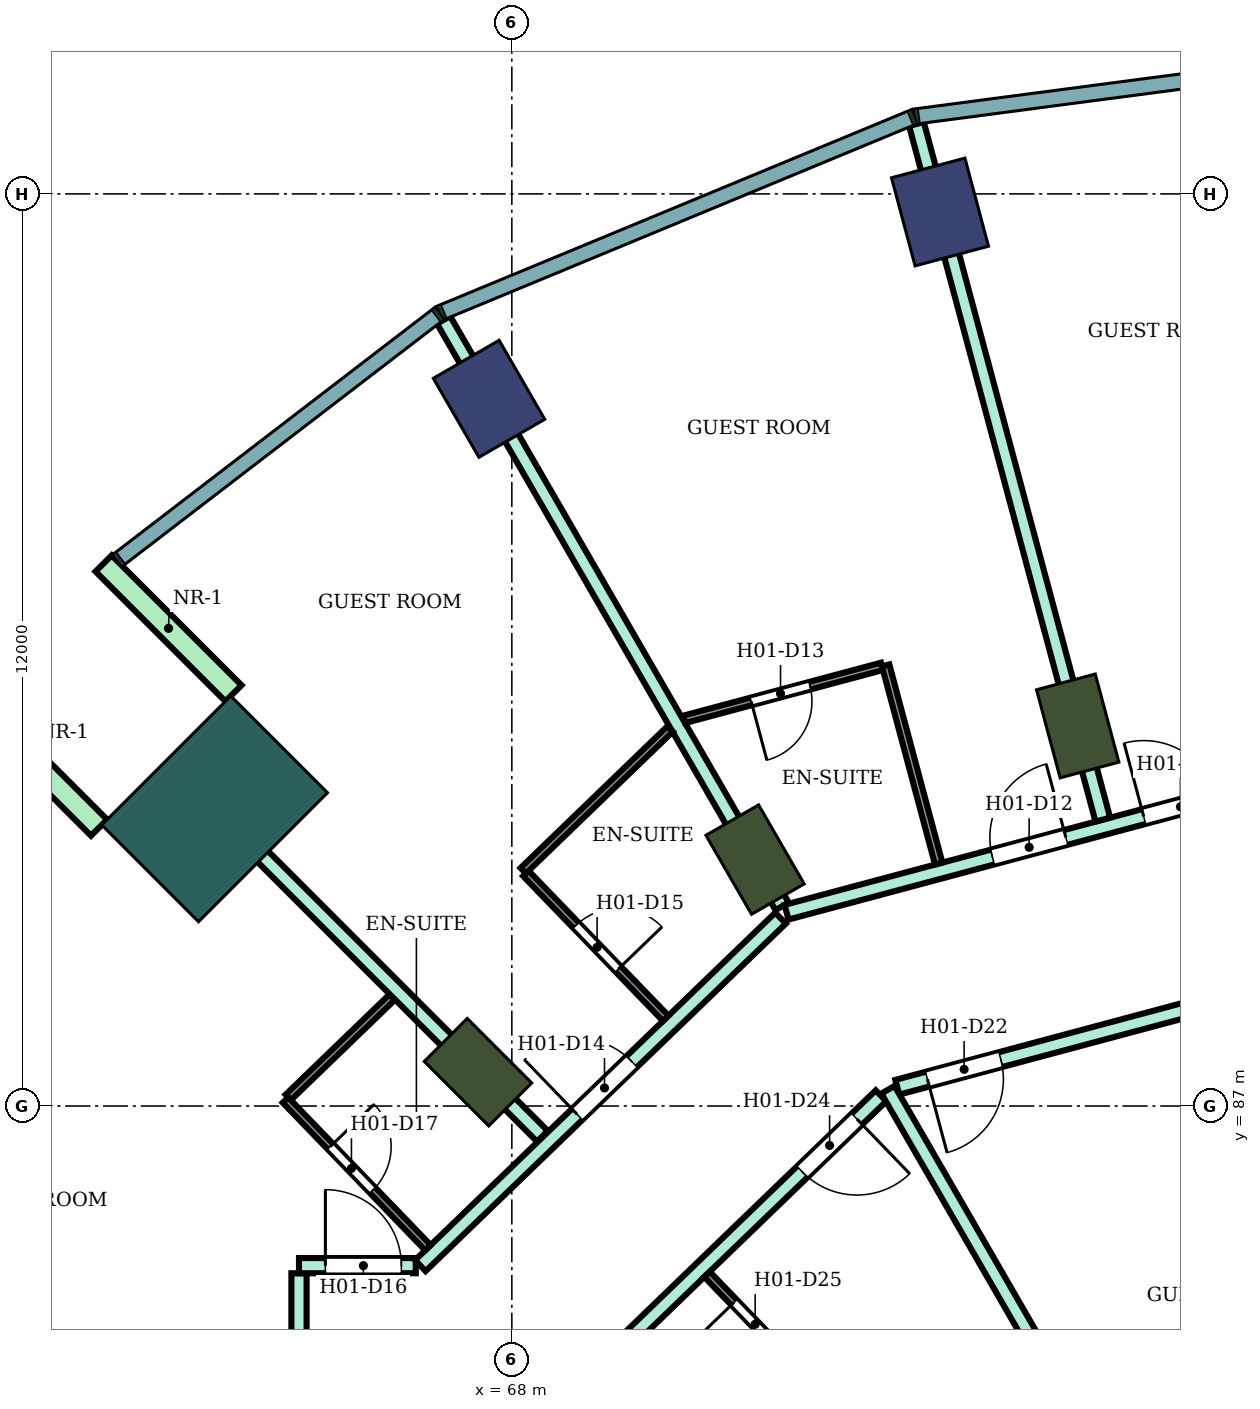
"""IFC4 building model, lengths in metres.
Left out: names, types, materials, properties, quantities, classifications, styles, units other than length and angle.
Written with IfcOpenShell. Run it as: python <this file> out.ifc"""

import sys

from ifc_helpers import new_model, si_unit, direction, frame, frame_2d, origin, origin_2d, place, context, subcontext, project, spatial, rectangle, extrude, element, fill, save


model = new_model("IFC4")
c1 = context("Model", 3, precision=1e-05, world=origin(), true_north=direction((0.0, 1.0)))
c2 = subcontext(c1, "Body", "Model", "MODEL_VIEW")
j1 = project(units=[si_unit("LENGTHUNIT", "METRE"), si_unit("PLANEANGLEUNIT", "RADIAN")], contexts=[c1])
p1 = place(None, origin())
s1 = spatial("IfcSite", under=j1, at=p1, CompositionType="ELEMENT")
p2 = place(p1, origin())
s2 = spatial("IfcBuilding", under=s1, at=p2, CompositionType="ELEMENT")
p3 = place(p2, frame((0.0, 0.0, 36.4)))
s3 = spatial("IfcBuildingStorey", under=s2, at=p3, CompositionType="ELEMENT", Elevation=36.4)
for number, where, z_axis, x_axis in (
    (1, (73.633, 98.762, 0.0), (0.0, 0.0, 1.0), (-0.259, 0.966, 0.0)),
    (2, (67.7, 96.304, 0.0), (0.0, 0.0, 1.0), (-0.5, 0.866, 0.0)),
):
    element("IfcColumn", number, at=place(p3, frame(where, z_axis=z_axis, x_axis=x_axis)), inside=s3, PredefinedType="COLUMN", context=c2, shape_type="SweptSolid", body=[
        extrude(rectangle(XDim=1.2, YDim=1.0, at=origin_2d()), origin(), (0.0, 0.0, 1.0), 3.8),
    ])
for number, where, z_axis, x_axis in (
    (3, (75.445, 92.0, 0.0), (0.0, 0.0, 1.0), (-0.259, 0.966, 0.0)),
    (4, (71.2, 90.242, 0.0), (0.0, 0.0, 1.0), (-0.5, 0.866, 0.0)),
    (5, (67.555, 87.445, 0.0), (0.0, 0.0, 1.0), (-0.707, 0.707, 0.0)),
):
    element("IfcColumn", number, at=place(p3, frame(where, z_axis=z_axis, x_axis=x_axis)), inside=s3, PredefinedType="COLUMN", context=c2, shape_type="SweptSolid", body=[
        extrude(rectangle(XDim=1.2, YDim=0.8, at=origin_2d()), origin(), (0.0, 0.0, 1.0), 3.8),
    ])
p4 = place(p3, frame((64.09, 90.91, 0.0), z_axis=(0.0, 0.0, 1.0), x_axis=(-0.707106781187, 0.707106781187, 0.0)))
e6 = element("IfcColumn", 6, at=p4, inside=s3, PredefinedType="COLUMN", context=c2, shape_type="SweptSolid", body=[
    extrude(rectangle(XDim=1.8, YDim=2.4, at=origin_2d()), origin(), (0.0, 0.0, 1.0), 3.8),
])
for number, where, z_axis, x_axis in (
    (7, (64.338, 92.43, 0.0), (0.0, 0.0, 1.0), (-0.707, 0.707, 0.0)),
    (8, (62.57, 90.662, 0.0), (0.0, 0.0, 1.0), (-0.707, 0.707, 0.0)),
):
    element("IfcWall", number, at=place(p3, frame(where, z_axis=z_axis, x_axis=x_axis)), inside=s3, PredefinedType="NOTDEFINED", context=c2, shape_type="SweptSolid", body=[
        extrude(rectangle(XDim=2.416, YDim=0.3, at=frame_2d((1.208, 0.0))), origin(), (0.0, 0.0, 1.0), 3.8),
    ])
p5 = place(p3, frame((63.599, 91.408, 0.0), z_axis=(0.0, 0.0, 1.0), x_axis=(0.706981017422, -0.707232522587, 0.0)))
e9 = element("IfcWall", 9, at=p5, inside=s3, PredefinedType="PARTITIONING", context=c2, shape_type="SweptSolid", body=[
    extrude(rectangle(XDim=6.795, YDim=0.2, at=frame_2d((3.397, 0.0))), origin(), (0.0, 0.0, 1.0), 3.35),
])
p6 = place(p3, frame((65.2, 83.401, 0.0), z_axis=(0.0, 0.0, 1.0), x_axis=(0.0, 1.0, 0.0)))
e10 = element("IfcWall", 10, at=p6, inside=s3, PredefinedType="PARTITIONING", context=c2, shape_type="SweptSolid", body=[
    extrude(rectangle(XDim=1.399, YDim=0.2, at=frame_2d((0.7, 0.0))), origin(), (0.0, 0.0, 1.0), 3.35),
])
p7 = place(p3, frame((65.2, 84.9, 0.0), z_axis=(0.0, 0.0, 1.0), x_axis=(1.0, 0.0, 0.0)))
e11 = element("IfcWall", 11, at=p7, inside=s3, PredefinedType="PARTITIONING", context=c2, shape_type="SweptSolid", body=[
    extrude(rectangle(XDim=1.536, YDim=0.2, at=frame_2d((0.768, 0.0))), origin(), (0.0, 0.0, 1.0), 3.35),
])
p8 = place(p7, frame((0.347, 0.0, 0.0)))
e12 = element("IfcOpeningElement", 12, at=p8, cuts=e11, PredefinedType="OPENING", context=c2, shape_type="SweptSolid", body=[
    extrude(rectangle(XDim=1.0, YDim=2.1, at=frame_2d((0.5, 1.05))), frame((0.0, 0.11, 0.0), z_axis=(0.0, -1.0, 0.0), x_axis=(1.0, 0.0, 0.0)), (0.0, 0.0, 1.0), 0.22),
])
p9 = place(p3, frame((66.796, 84.9, 0.0), z_axis=(0.0, 0.0, 1.0), x_axis=(0.719690131178, 0.694295409092, 0.0)))
e13 = element("IfcWall", 13, at=p9, inside=s3, PredefinedType="PARTITIONING", context=c2, shape_type="SweptSolid", body=[
    extrude(rectangle(XDim=6.585, YDim=0.2, at=frame_2d((3.293, 0.0))), origin(), (0.0, 0.0, 1.0), 3.35),
])
p10 = place(p9, frame((2.867, 0.0, 0.0)))
e14 = element("IfcOpeningElement", 14, at=p10, cuts=e13, PredefinedType="OPENING", context=c2, shape_type="SweptSolid", body=[
    extrude(rectangle(XDim=1.0, YDim=2.1, at=frame_2d((0.5, 1.05))), frame((0.0, 0.11, 0.0), z_axis=(0.0, -1.0, 0.0), x_axis=(1.0, 0.0, 0.0)), (0.0, 0.0, 1.0), 0.22),
])
p11 = place(p3, frame((67.102, 97.342, 0.0), z_axis=(0.0, 0.0, 1.0), x_axis=(0.499944680089, -0.866057340394, 0.0)))
e15 = element("IfcWall", 15, at=p11, inside=s3, PredefinedType="PARTITIONING", context=c2, shape_type="SweptSolid", body=[
    extrude(rectangle(XDim=8.908, YDim=0.2, at=frame_2d((4.454, 0.0))), origin(), (0.0, 0.0, 1.0), 3.35),
])
p12 = place(p3, frame((68.987, 83.4, 0.0), z_axis=(0.0, 0.0, 1.0), x_axis=(0.719591503389, 0.694397629784, 0.0)))
e16 = element("IfcWall", 16, at=p12, inside=s3, PredefinedType="PARTITIONING", context=c2, shape_type="SweptSolid", body=[
    extrude(rectangle(XDim=5.378, YDim=0.2, at=frame_2d((2.689, 0.0))), origin(), (0.0, 0.0, 1.0), 3.35),
])
p13 = place(p12, frame((3.938, 0.0, 0.0)))
e17 = element("IfcOpeningElement", 17, at=p13, cuts=e16, PredefinedType="OPENING", context=c2, shape_type="SweptSolid", body=[
    extrude(rectangle(XDim=1.0, YDim=2.1, at=frame_2d((0.5, 1.05))), frame((0.0, 0.11, 0.0), z_axis=(0.0, -1.0, 0.0), x_axis=(1.0, 0.0, 0.0)), (0.0, 0.0, 1.0), 0.22),
])
p14 = place(p3, frame((71.614, 89.55, 0.0), z_axis=(0.0, 0.0, 1.0), x_axis=(0.965982156828, 0.258608725086, 0.0)))
e18 = element("IfcWall", 18, at=p14, inside=s3, PredefinedType="PARTITIONING", context=c2, shape_type="SweptSolid", body=[
    extrude(rectangle(XDim=8.592, YDim=0.2, at=frame_2d((4.296, 0.0))), origin(), (0.0, 0.0, 1.0), 3.35),
])
p15 = place(p14, frame((4.865, 0.0, 0.0)))
e19 = element("IfcOpeningElement", 19, at=p15, cuts=e18, PredefinedType="OPENING", context=c2, shape_type="SweptSolid", body=[
    extrude(rectangle(XDim=1.0, YDim=2.1, at=frame_2d((0.5, 1.05))), frame((0.0, 0.11, 0.0), z_axis=(0.0, -1.0, 0.0), x_axis=(1.0, 0.0, 0.0)), (0.0, 0.0, 1.0), 0.22),
])
p16 = place(p14, frame((2.804, 0.0, 0.0)))
e20 = element("IfcOpeningElement", 20, at=p16, cuts=e18, PredefinedType="OPENING", context=c2, shape_type="SweptSolid", body=[
    extrude(rectangle(XDim=1.0, YDim=2.1, at=frame_2d((0.5, 1.05))), frame((0.0, 0.11, 0.0), z_axis=(0.0, -1.0, 0.0), x_axis=(1.0, 0.0, 0.0)), (0.0, 0.0, 1.0), 0.22),
])
p17 = place(p3, frame((73.071, 87.247, 0.0), z_axis=(0.0, 0.0, 1.0), x_axis=(0.965931651205, 0.258797305243, 0.0)))
e21 = element("IfcWall", 21, at=p17, inside=s3, PredefinedType="PARTITIONING", context=c2, shape_type="SweptSolid", body=[
    extrude(rectangle(XDim=7.043, YDim=0.2, at=frame_2d((3.521, 0.0))), origin(), (0.0, 0.0, 1.0), 3.35),
])
p18 = place(p17, frame((0.41, 0.0, 0.0)))
e22 = element("IfcOpeningElement", 22, at=p18, cuts=e21, PredefinedType="OPENING", context=c2, shape_type="SweptSolid", body=[
    extrude(rectangle(XDim=1.0, YDim=2.1, at=frame_2d((0.5, 1.05))), frame((0.0, 0.11, 0.0), z_axis=(0.0, -1.0, 0.0), x_axis=(1.0, 0.0, 0.0)), (0.0, 0.0, 1.0), 0.22),
])
p19 = place(p3, frame((72.948, 87.214, 0.0), z_axis=(0.0, 0.0, 1.0), x_axis=(0.499943524694, -0.866058007363, 0.0)))
e23 = element("IfcWall", 23, at=p19, inside=s3, PredefinedType="PARTITIONING", context=c2, shape_type="SweptSolid", body=[
    extrude(rectangle(XDim=6.405, YDim=0.2, at=frame_2d((3.203, 0.0))), origin(), (0.0, 0.0, 1.0), 3.35),
])
p20 = place(p3, frame((73.323, 99.919, 0.0), z_axis=(0.0, 0.0, 1.0), x_axis=(0.258817230439, -0.965926312525, 0.0)))
e24 = element("IfcWall", 24, at=p20, inside=s3, PredefinedType="PARTITIONING", context=c2, shape_type="SweptSolid", body=[
    extrude(rectangle(XDim=9.474, YDim=0.2, at=frame_2d((4.737, 0.0))), origin(), (0.0, 0.0, 1.0), 3.35),
])
p21 = place(p3, frame((65.058, 87.114, 0.0), z_axis=(0.0, 0.0, 1.0), x_axis=(0.719715847356, 0.694268751324, 0.0)))
e25 = element("IfcWall", 25, at=p21, inside=s3, PredefinedType="PARTITIONING", context=c2, shape_type="SweptSolid", body=[
    extrude(rectangle(XDim=1.9, YDim=0.1, at=frame_2d((0.95, 0.0))), origin(), (0.0, 0.0, 1.0), 3.35),
])
p22 = place(p3, frame((65.022, 87.079, 0.0), z_axis=(0.0, 0.0, 1.0), x_axis=(0.694287838235, -0.719697434815, 0.0)))
e26 = element("IfcWall", 26, at=p22, inside=s3, PredefinedType="PARTITIONING", context=c2, shape_type="SweptSolid", body=[
    extrude(rectangle(XDim=2.7, YDim=0.1, at=frame_2d((1.35, 0.0))), origin(), (0.0, 0.0, 1.0), 3.35),
])
p23 = place(p22, frame((0.85, 0.0, 0.0)))
e27 = element("IfcOpeningElement", 27, at=p23, cuts=e26, PredefinedType="OPENING", context=c2, shape_type="SweptSolid", body=[
    extrude(rectangle(XDim=0.8, YDim=2.1, at=frame_2d((0.4, 1.05))), frame((0.0, 0.06, 0.0), z_axis=(0.0, -1.0, 0.0), x_axis=(1.0, 0.0, 0.0)), (0.0, 0.0, 1.0), 0.12),
])
p24 = place(p3, frame((68.185, 90.06, 0.0), z_axis=(0.0, 0.0, 1.0), x_axis=(0.69446127412, -0.719530081892, 0.0)))
e28 = element("IfcWall", 28, at=p24, inside=s3, PredefinedType="PARTITIONING", context=c2, shape_type="SweptSolid", body=[
    extrude(rectangle(XDim=2.649, YDim=0.1, at=frame_2d((1.324, 0.0))), origin(), (0.0, 0.0, 1.0), 3.35),
])
p25 = place(p24, frame((0.95, 0.0, 0.0)))
e29 = element("IfcOpeningElement", 29, at=p25, cuts=e28, PredefinedType="OPENING", context=c2, shape_type="SweptSolid", body=[
    extrude(rectangle(XDim=0.8, YDim=2.1, at=frame_2d((0.4, 1.05))), frame((0.0, 0.06, 0.0), z_axis=(0.0, -1.0, 0.0), x_axis=(1.0, 0.0, 0.0)), (0.0, 0.0, 1.0), 0.12),
])
p26 = place(p3, frame((68.15, 90.096, 0.0), z_axis=(0.0, 0.0, 1.0), x_axis=(0.719669144226, 0.694317163009, 0.0)))
e30 = element("IfcWall", 30, at=p26, inside=s3, PredefinedType="PARTITIONING", context=c2, shape_type="SweptSolid", body=[
    extrude(rectangle(XDim=2.687, YDim=0.1, at=frame_2d((1.343, 0.0))), origin(), (0.0, 0.0, 1.0), 3.35),
])
p27 = place(p3, frame((70.268, 92.087, 0.0), z_axis=(0.0, 0.0, 1.0), x_axis=(0.965931867509, 0.258796497911, 0.0)))
e31 = element("IfcWall", 31, at=p27, inside=s3, PredefinedType="PARTITIONING", context=c2, shape_type="SweptSolid", body=[
    extrude(rectangle(XDim=2.693, YDim=0.1, at=frame_2d((1.347, 0.0))), origin(), (0.0, 0.0, 1.0), 3.35),
])
p28 = place(p27, frame((0.912, 0.0, 0.0)))
e32 = element("IfcOpeningElement", 32, at=p28, cuts=e31, PredefinedType="OPENING", context=c2, shape_type="SweptSolid", body=[
    extrude(rectangle(XDim=0.8, YDim=2.1, at=frame_2d((0.4, 1.05))), frame((0.0, 0.06, 0.0), z_axis=(0.0, -1.0, 0.0), x_axis=(1.0, 0.0, 0.0)), (0.0, 0.0, 1.0), 0.12),
])
p29 = place(p3, frame((70.567, 84.786, 0.0), z_axis=(0.0, 0.0, 1.0), x_axis=(0.694447472534, -0.719543402368, 0.0)))
e33 = element("IfcWall", 33, at=p29, inside=s3, PredefinedType="PARTITIONING", context=c2, shape_type="SweptSolid", body=[
    extrude(rectangle(XDim=1.926, YDim=0.1, at=frame_2d((0.963, 0.0))), origin(), (0.0, 0.0, 1.0), 3.35),
])
p30 = place(p29, frame((0.513, 0.0, 0.0)))
e34 = element("IfcOpeningElement", 34, at=p30, cuts=e33, PredefinedType="OPENING", context=c2, shape_type="SweptSolid", body=[
    extrude(rectangle(XDim=0.8, YDim=2.1, at=frame_2d((0.4, 1.05))), frame((0.0, 0.06, 0.0), z_axis=(0.0, -1.0, 0.0), x_axis=(1.0, 0.0, 0.0)), (0.0, 0.0, 1.0), 0.12),
])
p31 = place(p3, frame((72.918, 92.797, 0.0), z_axis=(0.0, 0.0, 1.0), x_axis=(0.25867580527, -0.965964195904, 0.0)))
e35 = element("IfcWall", 35, at=p31, inside=s3, PredefinedType="PARTITIONING", context=c2, shape_type="SweptSolid", body=[
    extrude(rectangle(XDim=2.699, YDim=0.1, at=frame_2d((1.35, 0.0))), origin(), (0.0, 0.0, 1.0), 3.35),
])
p32 = place(p15, origin())
e36 = element("IfcDoor", 36, at=p32, inside=s3, OperationType="SINGLE_SWING_LEFT", PredefinedType="DOOR", context=c2, shape_type="SweptSolid", body=[
    extrude(rectangle(XDim=1.0, YDim=2.1, at=frame_2d((0.5, 1.05))), frame((0.0, 0.025, 0.0), z_axis=(0.0, -1.0, 0.0), x_axis=(1.0, 0.0, 0.0)), (0.0, 0.0, 1.0), 0.05),
])
fill(e19, e36)
p33 = place(p16, origin())
e37 = element("IfcDoor", 37, at=p33, inside=s3, OperationType="SINGLE_SWING_RIGHT", PredefinedType="DOOR", context=c2, shape_type="SweptSolid", body=[
    extrude(rectangle(XDim=1.0, YDim=2.1, at=frame_2d((0.5, 1.05))), frame((0.0, 0.025, 0.0), z_axis=(0.0, -1.0, 0.0), x_axis=(1.0, 0.0, 0.0)), (0.0, 0.0, 1.0), 0.05),
])
fill(e20, e37)
p34 = place(p28, frame((0.8, 0.0, 0.0), z_axis=(0.0, 0.0, 1.0), x_axis=(-1.0, 0.0, 0.0)))
e38 = element("IfcDoor", 38, at=p34, inside=s3, OperationType="SINGLE_SWING_RIGHT", PredefinedType="DOOR", context=c2, shape_type="SweptSolid", body=[
    extrude(rectangle(XDim=0.8, YDim=2.1, at=frame_2d((0.4, 1.05))), frame((0.0, 0.025, 0.0), z_axis=(0.0, -1.0, 0.0), x_axis=(1.0, 0.0, 0.0)), (0.0, 0.0, 1.0), 0.05),
])
fill(e32, e38)
p35 = place(p10, origin())
e39 = element("IfcDoor", 39, at=p35, inside=s3, OperationType="SINGLE_SWING_LEFT", PredefinedType="DOOR", context=c2, shape_type="SweptSolid", body=[
    extrude(rectangle(XDim=1.0, YDim=2.1, at=frame_2d((0.5, 1.05))), frame((0.0, 0.025, 0.0), z_axis=(0.0, -1.0, 0.0), x_axis=(1.0, 0.0, 0.0)), (0.0, 0.0, 1.0), 0.05),
])
fill(e14, e39)
p36 = place(p25, origin())
e40 = element("IfcDoor", 40, at=p36, inside=s3, OperationType="SINGLE_SWING_RIGHT", PredefinedType="DOOR", context=c2, shape_type="SweptSolid", body=[
    extrude(rectangle(XDim=0.8, YDim=2.1, at=frame_2d((0.4, 1.05))), frame((0.0, 0.025, 0.0), z_axis=(0.0, -1.0, 0.0), x_axis=(1.0, 0.0, 0.0)), (0.0, 0.0, 1.0), 0.05),
])
fill(e29, e40)
p37 = place(p8, origin())
e41 = element("IfcDoor", 41, at=p37, inside=s3, OperationType="SINGLE_SWING_LEFT", PredefinedType="DOOR", context=c2, shape_type="SweptSolid", body=[
    extrude(rectangle(XDim=1.0, YDim=2.1, at=frame_2d((0.5, 1.05))), frame((0.0, 0.025, 0.0), z_axis=(0.0, -1.0, 0.0), x_axis=(1.0, 0.0, 0.0)), (0.0, 0.0, 1.0), 0.05),
])
fill(e12, e41)
p38 = place(p23, origin())
e42 = element("IfcDoor", 42, at=p38, inside=s3, OperationType="SINGLE_SWING_LEFT", PredefinedType="DOOR", context=c2, shape_type="SweptSolid", body=[
    extrude(rectangle(XDim=0.8, YDim=2.1, at=frame_2d((0.4, 1.05))), frame((0.0, 0.025, 0.0), z_axis=(0.0, -1.0, 0.0), x_axis=(1.0, 0.0, 0.0)), (0.0, 0.0, 1.0), 0.05),
])
fill(e27, e42)
p39 = place(p18, frame((1.0, 0.0, 0.0), z_axis=(0.0, 0.0, 1.0), x_axis=(-1.0, 0.0, 0.0)))
e43 = element("IfcDoor", 43, at=p39, inside=s3, OperationType="SINGLE_SWING_RIGHT", PredefinedType="DOOR", context=c2, shape_type="SweptSolid", body=[
    extrude(rectangle(XDim=1.0, YDim=2.1, at=frame_2d((0.5, 1.05))), frame((0.0, 0.025, 0.0), z_axis=(0.0, -1.0, 0.0), x_axis=(1.0, 0.0, 0.0)), (0.0, 0.0, 1.0), 0.05),
])
fill(e22, e43)
p40 = place(p13, frame((1.0, 0.0, 0.0), z_axis=(0.0, 0.0, 1.0), x_axis=(-1.0, 0.0, 0.0)))
e44 = element("IfcDoor", 44, at=p40, inside=s3, OperationType="SINGLE_SWING_LEFT", PredefinedType="DOOR", context=c2, shape_type="SweptSolid", body=[
    extrude(rectangle(XDim=1.0, YDim=2.1, at=frame_2d((0.5, 1.05))), frame((0.0, 0.025, 0.0), z_axis=(0.0, -1.0, 0.0), x_axis=(1.0, 0.0, 0.0)), (0.0, 0.0, 1.0), 0.05),
])
fill(e17, e44)
p41 = place(p30, frame((0.8, 0.0, 0.0), z_axis=(0.0, 0.0, 1.0), x_axis=(-1.0, 0.0, 0.0)))
e45 = element("IfcDoor", 45, at=p41, inside=s3, OperationType="SINGLE_SWING_RIGHT", PredefinedType="DOOR", context=c2, shape_type="SweptSolid", body=[
    extrude(rectangle(XDim=0.8, YDim=2.1, at=frame_2d((0.4, 1.05))), frame((0.0, 0.025, 0.0), z_axis=(0.0, -1.0, 0.0), x_axis=(1.0, 0.0, 0.0)), (0.0, 0.0, 1.0), 0.05),
])
fill(e34, e45)
save(model, sys.argv[1])
